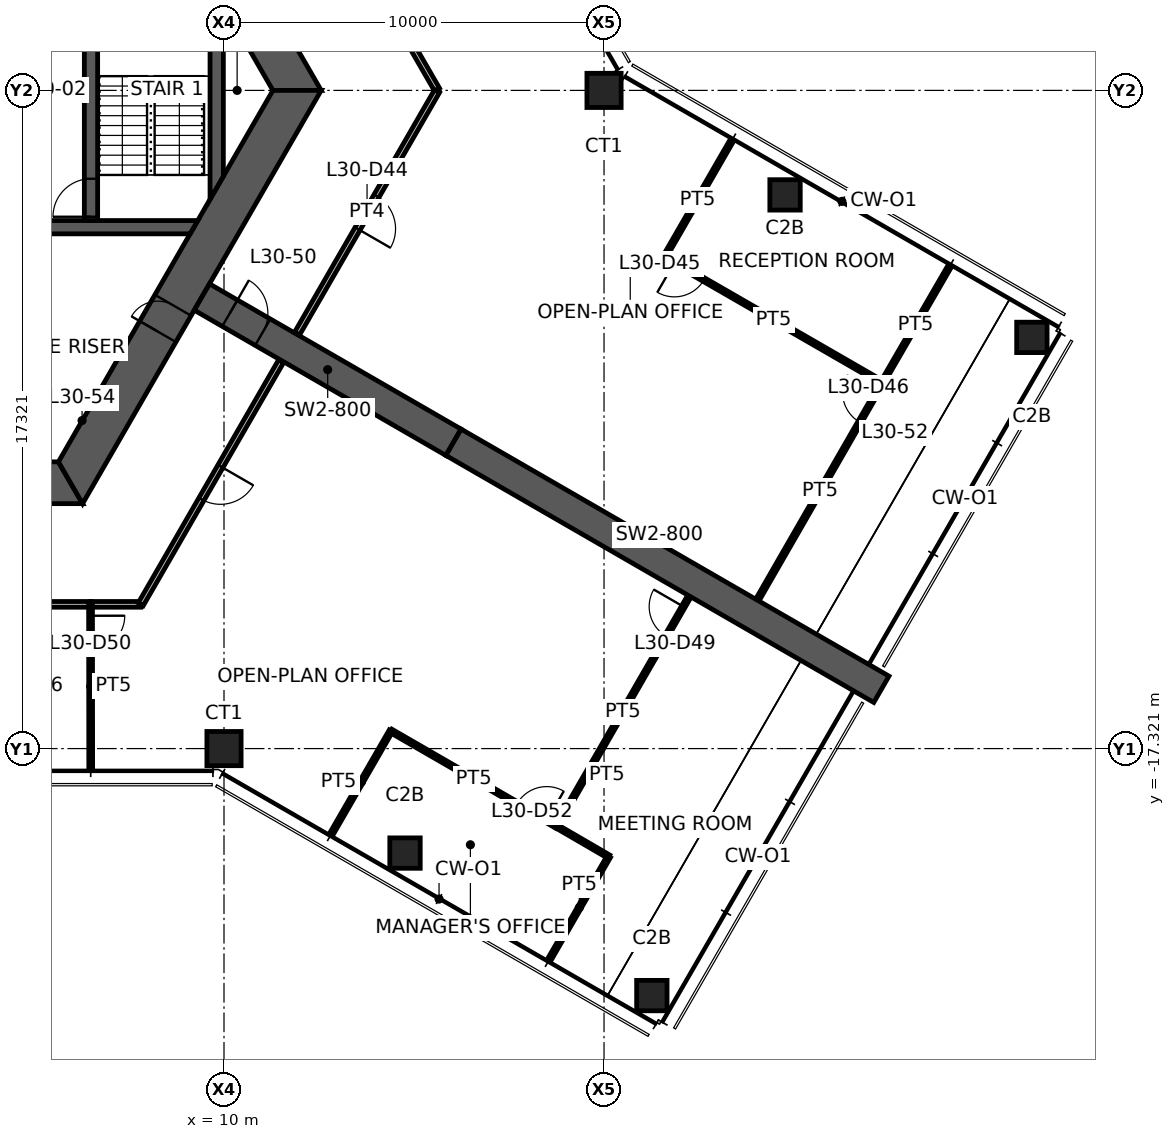
"""IFC4 building model, lengths in metres.
Left out: names, types, materials, properties, quantities, classifications, styles, units other than length and angle.
Written with IfcOpenShell. Run it as: python <this file> out.ifc"""

import sys

from ifc_helpers import new_model, si_unit, direction, frame, frame_2d, origin, origin_2d, place, context, subcontext, project, spatial, polyline, rectangle, hollow_rectangle, outline, extrude, element, fill, save


model = new_model("IFC4")
c1 = context("Model", 3, precision=1e-05, world=origin(), true_north=direction((0.0, 1.0)))
c2 = subcontext(c1, "Body", "Model", "MODEL_VIEW")
j1 = project(units=[si_unit("LENGTHUNIT", "METRE"), si_unit("PLANEANGLEUNIT", "RADIAN")], contexts=[c1])
p1 = place(None, origin())
s1 = spatial("IfcSite", under=j1, at=p1, CompositionType="ELEMENT")
p2 = place(p1, origin())
s2 = spatial("IfcBuilding", under=s1, at=p2, CompositionType="ELEMENT")
p3 = place(p2, frame((0.0, 0.0, 119.7)))
s3 = spatial("IfcBuildingStorey", under=s2, at=p3, CompositionType="ELEMENT", Elevation=119.7)
for number, where, z_axis, x_axis in (
    (1, (20.0, 0.0, 0.0), (0.0, 0.0, 1.0), (1.0, 0.0, 0.0)),
    (2, (10.0, -17.321, 0.0), (0.0, 0.0, 1.0), (1.0, 0.0, 0.0)),
):
    element("IfcColumn", number, at=place(p3, frame(where, z_axis=z_axis, x_axis=x_axis)), inside=s3, PredefinedType="COLUMN", context=c2, shape_type="SweptSolid", body=[
        extrude(hollow_rectangle(XDim=0.9, YDim=0.9, WallThickness=0.07, at=origin_2d()), origin(), (0.0, 0.0, 1.0), 3.9),
    ])
for number, where, z_axis, x_axis in (
    (3, (14.763, -20.071, 0.0), (0.0, 0.0, 1.0), (1.0, 0.0, 0.0)),
    (4, (21.258, -23.821, 0.0), (0.0, 0.0, 1.0), (1.0, 0.0, 0.0)),
    (5, (24.763, -2.75, 0.0), (0.0, 0.0, 1.0), (1.0, 0.0, 0.0)),
    (6, (31.258, -6.5, 0.0), (0.0, 0.0, 1.0), (1.0, 0.0, 0.0)),
):
    element("IfcColumn", number, at=place(p3, frame(where, z_axis=z_axis, x_axis=x_axis)), inside=s3, PredefinedType="COLUMN", context=c2, shape_type="SweptSolid", body=[
        extrude(hollow_rectangle(XDim=0.8, YDim=0.8, WallThickness=0.045, at=origin_2d()), origin(), (0.0, 0.0, 1.0), 3.9),
    ])
p4 = place(p3, frame((11.922, 0.0, 0.0), z_axis=(0.0, 0.0, 1.0), x_axis=(-0.500004296715, 0.866022923061, 0.0)))
e7 = element("IfcWall", 7, at=p4, inside=s3, PredefinedType="SHEAR", context=c2, shape_type="SweptSolid", body=[
    extrude(outline(polyline([(-0.318, -0.55), (5.835, -0.55), (6.635, -0.55), (12.24, -0.55), (11.605, 0.55), (6.635, 0.55), (5.835, 0.55), (0.318, 0.55), (-0.318, -0.55)])), origin(), (0.0, 0.0, 1.0), 3.9),
])
p5 = place(p4, frame((5.835, 0.0, 0.0)))
e8 = element("IfcOpeningElement", 8, at=p5, cuts=e7, PredefinedType="OPENING", context=c2, shape_type="SweptSolid", body=[
    extrude(rectangle(XDim=0.8, YDim=2.1, at=frame_2d((0.4, 1.05))), frame((0.0, 0.56, 0.0), z_axis=(0.0, -1.0, 0.0), x_axis=(1.0, 0.0, 0.0)), (0.0, 0.0, 1.0), 1.12),
])
p6 = place(p3, frame((-5.961, -10.325, 0.0), z_axis=(0.0, 0.0, 1.0), x_axis=(1.0, 0.0, 0.0)))
e9 = element("IfcWall", 9, at=p6, inside=s3, PredefinedType="SHEAR", context=c2, shape_type="SweptSolid", body=[
    extrude(outline(polyline([(-0.318, -0.55), (5.461, -0.55), (6.461, -0.55), (12.24, -0.55), (11.605, 0.55), (6.461, 0.55), (5.461, 0.55), (0.318, 0.55), (-0.318, -0.55)])), origin(), (0.0, 0.0, 1.0), 3.9),
])
p7 = place(p6, frame((5.461, 0.0, 0.0)))
e10 = element("IfcOpeningElement", 10, at=p7, cuts=e9, PredefinedType="OPENING", context=c2, shape_type="SweptSolid", body=[
    extrude(rectangle(XDim=1.0, YDim=2.1, at=frame_2d((0.5, 1.05))), frame((0.0, 0.56, 0.0), z_axis=(0.0, -1.0, 0.0), x_axis=(1.0, 0.0, 0.0)), (0.0, 0.0, 1.0), 1.12),
])
p8 = place(p3, frame((5.961, -10.325, 0.0), z_axis=(0.0, 0.0, 1.0), x_axis=(0.500004296715, 0.866022923061, 0.0)))
e11 = element("IfcWall", 11, at=p8, inside=s3, PredefinedType="SHEAR", context=c2, shape_type="SweptSolid", body=[
    extrude(outline(polyline([(-0.318, -0.55), (4.594, -0.55), (5.394, -0.55), (12.24, -0.55), (11.605, 0.55), (5.394, 0.55), (4.594, 0.55), (0.318, 0.55), (-0.318, -0.55)])), origin(), (0.0, 0.0, 1.0), 3.9),
])
p9 = place(p8, frame((4.594, 0.0, 0.0)))
e12 = element("IfcOpeningElement", 12, at=p9, cuts=e11, PredefinedType="OPENING", context=c2, shape_type="SweptSolid", body=[
    extrude(rectangle(XDim=0.8, YDim=2.1, at=frame_2d((0.4, 1.05))), frame((0.0, 0.56, 0.0), z_axis=(0.0, -1.0, 0.0), x_axis=(1.0, 0.0, 0.0)), (0.0, 0.0, 1.0), 1.12),
])
p10 = place(p3, frame((9.418, -5.438, 0.0), z_axis=(0.0, 0.0, 1.0), x_axis=(0.866029782078, -0.499992416496, 0.0)))
e13 = element("IfcWall", 13, at=p10, inside=s3, PredefinedType="SHEAR", context=c2, shape_type="SweptSolid", body=[
    extrude(rectangle(XDim=7.646, YDim=0.8, at=frame_2d((3.823, 0.0))), origin(), (0.0, 0.0, 1.0), 3.9),
])
p11 = place(p10, frame((0.85, 0.0, 0.0)))
e14 = element("IfcOpeningElement", 14, at=p11, cuts=e13, PredefinedType="OPENING", context=c2, shape_type="SweptSolid", body=[
    extrude(rectangle(XDim=1.0, YDim=2.1, at=frame_2d((0.5, 1.05))), frame((0.0, 0.41, 0.0), z_axis=(0.0, -1.0, 0.0), x_axis=(1.0, 0.0, 0.0)), (0.0, 0.0, 1.0), 0.82),
])
p12 = place(p3, frame((16.039, -9.26, 0.0), z_axis=(0.0, 0.0, 1.0), x_axis=(0.866024837091, -0.50000098154, 0.0)))
e15 = element("IfcWall", 15, at=p12, inside=s3, PredefinedType="SHEAR", context=c2, shape_type="SweptSolid", body=[
    extrude(rectangle(XDim=13.0, YDim=0.8, at=frame_2d((6.5, 0.0))), origin(), (0.0, 0.0, 1.0), 3.9),
])
p13 = place(p3, frame((1.425, -3.6, 0.0), z_axis=(0.0, 0.0, 1.0), x_axis=(1.0, 0.0, 0.0)))
e16 = element("IfcWall", 16, at=p13, inside=s3, PredefinedType="SHEAR", context=c2, shape_type="SweptSolid", body=[
    extrude(outline(polyline([(0.0, -0.175), (1.075, -0.175), (2.175, -0.175), (7.683, -0.175), (7.885, 0.175), (2.175, 0.175), (1.075, 0.175), (0.0, 0.175), (0.0, -0.175)])), origin(), (0.0, 0.0, 1.0), 3.9),
])
p14 = place(p13, frame((1.075, 0.0, 0.0)))
e17 = element("IfcOpeningElement", 17, at=p14, cuts=e16, PredefinedType="OPENING", context=c2, shape_type="SweptSolid", body=[
    extrude(rectangle(XDim=1.1, YDim=2.1, at=frame_2d((0.55, 1.05))), frame((0.0, 0.185, 0.0), z_axis=(0.0, -1.0, 0.0), x_axis=(1.0, 0.0, 0.0)), (0.0, 0.0, 1.0), 0.37),
])
p15 = place(p3, frame((6.5, -3.425, 0.0), z_axis=(0.0, 0.0, 1.0), x_axis=(0.0, 1.0, 0.0)))
e18 = element("IfcWall", 18, at=p15, inside=s3, PredefinedType="SHEAR", context=c2, shape_type="SweptSolid", body=[
    extrude(rectangle(XDim=6.85, YDim=0.35, at=frame_2d((3.425, 0.0))), origin(), (0.0, 0.0, 1.0), 3.9),
])
p16 = place(p15, frame((0.1, 0.0, 0.0)))
e19 = element("IfcOpeningElement", 19, at=p16, cuts=e18, PredefinedType="OPENING", context=c2, shape_type="SweptSolid", body=[
    extrude(rectangle(XDim=1.0, YDim=2.1, at=frame_2d((0.5, 1.05))), frame((0.0, 0.185, 0.0), z_axis=(0.0, -1.0, 0.0), x_axis=(1.0, 0.0, 0.0)), (0.0, 0.0, 1.0), 0.37),
])
p17 = place(p3, frame((9.808, -2.562, 0.0), z_axis=(0.0, 0.0, 1.0), x_axis=(0.0, 1.0, 0.0)))
e20 = element("IfcWall", 20, at=p17, inside=s3, PredefinedType="SHEAR", context=c2, shape_type="SweptSolid", body=[
    extrude(outline(polyline([(0.303, -0.175), (4.821, -0.175), (5.428, 0.175), (-0.303, 0.175), (0.303, -0.175)])), origin(), (0.0, 0.0, 1.0), 3.9),
])
p18 = place(p3, frame((13.334, 3.955, 0.0), z_axis=(0.0, 0.0, 1.0), x_axis=(0.499987549055, -0.866032592222, 0.0)))
e21 = element("IfcWall", 21, at=p18, inside=s3, PredefinedType="PARTITIONING", context=c2, shape_type="SweptSolid", body=[
    extrude(rectangle(XDim=4.544, YDim=0.15, at=frame_2d((2.272, 0.0))), origin(), (0.0, 0.0, 1.0), 2.35),
])
p19 = place(p3, frame((15.606, -0.02, 0.0), z_axis=(0.0, 0.0, 1.0), x_axis=(-0.499989298045, -0.866031582473, 0.0)))
e22 = element("IfcWall", 22, at=p19, inside=s3, PredefinedType="PARTITIONING", context=c2, shape_type="SweptSolid", body=[
    extrude(rectangle(XDim=7.365, YDim=0.15, at=frame_2d((3.683, 0.0))), origin(), (0.0, 0.0, 1.0), 2.35),
])
p20 = place(p19, frame((3.183, 0.0, 0.0)))
e23 = element("IfcOpeningElement", 23, at=p20, cuts=e22, PredefinedType="OPENING", context=c2, shape_type="SweptSolid", body=[
    extrude(rectangle(XDim=1.0, YDim=2.1, at=frame_2d((0.5, 1.05))), frame((0.0, 0.085, 0.0), z_axis=(0.0, -1.0, 0.0), x_axis=(1.0, 0.0, 0.0)), (0.0, 0.0, 1.0), 0.17),
])
p21 = place(p3, frame((29.075, -4.662, 0.0), z_axis=(0.0, 0.0, 1.0), x_axis=(-0.501335959492, -0.865252712056, 0.0)))
e24 = element("IfcWall", 24, at=p21, inside=s3, PredefinedType="PARTITIONING", context=c2, shape_type="SweptSolid", body=[
    extrude(rectangle(XDim=3.5, YDim=0.1, at=frame_2d((1.75, 0.0))), origin(), (0.0, 0.0, 1.0), 2.35),
])
p22 = place(p3, frame((21.592, -4.383, 0.0), z_axis=(0.0, 0.0, 1.0), x_axis=(0.500009906705, 0.86601968407, 0.0)))
e25 = element("IfcWall", 25, at=p22, inside=s3, PredefinedType="PARTITIONING", context=c2, shape_type="SweptSolid", body=[
    extrude(rectangle(XDim=3.48, YDim=0.1, at=frame_2d((1.74, 0.0))), origin(), (0.0, 0.0, 1.0), 2.35),
])
p23 = place(p3, frame((27.327, -7.69, 0.0), z_axis=(0.0, 0.0, 1.0), x_axis=(-0.866318796728, 0.499491483847, 0.0)))
e26 = element("IfcWall", 26, at=p23, inside=s3, PredefinedType="PARTITIONING", context=c2, shape_type="SweptSolid", body=[
    extrude(rectangle(XDim=6.62, YDim=0.1, at=frame_2d((3.31, 0.0))), origin(), (0.0, 0.0, 1.0), 2.35),
])
p24 = place(p23, frame((5.42, 0.0, 0.0)))
e27 = element("IfcOpeningElement", 27, at=p24, cuts=e26, PredefinedType="OPENING", context=c2, shape_type="SweptSolid", body=[
    extrude(rectangle(XDim=0.9, YDim=2.1, at=frame_2d((0.45, 1.05))), frame((0.0, 0.06, 0.0), z_axis=(0.0, -1.0, 0.0), x_axis=(1.0, 0.0, 0.0)), (0.0, 0.0, 1.0), 0.12),
])
p25 = place(p3, frame((24.043, -13.396, 0.0), z_axis=(0.0, 0.0, 1.0), x_axis=(0.498632747728, 0.866813349512, 0.0)))
e28 = element("IfcWall", 28, at=p25, inside=s3, PredefinedType="PARTITIONING", context=c2, shape_type="SweptSolid", body=[
    extrude(rectangle(XDim=6.584, YDim=0.1, at=frame_2d((3.292, 0.0))), origin(), (0.0, 0.0, 1.0), 2.35),
])
p26 = place(p25, frame((5.384, 0.0, 0.0)))
e29 = element("IfcOpeningElement", 29, at=p26, cuts=e28, PredefinedType="OPENING", context=c2, shape_type="SweptSolid", body=[
    extrude(rectangle(XDim=0.9, YDim=2.1, at=frame_2d((0.45, 1.05))), frame((0.0, 0.06, 0.0), z_axis=(0.0, -1.0, 0.0), x_axis=(1.0, 0.0, 0.0)), (0.0, 0.0, 1.0), 0.12),
])
p27 = place(p3, frame((6.498, -13.525, 0.0), z_axis=(0.0, 0.0, 1.0), x_axis=(-1.0, 0.0, 0.0)))
e30 = element("IfcWall", 30, at=p27, inside=s3, PredefinedType="PARTITIONING", context=c2, shape_type="SweptSolid", body=[
    extrude(rectangle(XDim=3.256, YDim=0.15, at=frame_2d((1.628, 0.0))), origin(), (0.0, 0.0, 1.0), 2.35),
])
p28 = place(p3, frame((7.809, -13.525, 0.0), z_axis=(0.0, 0.0, 1.0), x_axis=(-1.0, 0.0, 0.0)))
e31 = element("IfcWall", 31, at=p28, inside=s3, PredefinedType="PARTITIONING", context=c2, shape_type="SweptSolid", body=[
    extrude(rectangle(XDim=1.32, YDim=0.15, at=frame_2d((0.66, 0.0))), origin(), (0.0, 0.0, 1.0), 2.35),
])
p29 = place(p3, frame((11.503, -7.126, 0.0), z_axis=(0.0, 0.0, 1.0), x_axis=(-0.500005620463, -0.866022158784, 0.0)))
e32 = element("IfcWall", 32, at=p29, inside=s3, PredefinedType="PARTITIONING", context=c2, shape_type="SweptSolid", body=[
    extrude(rectangle(XDim=7.389, YDim=0.15, at=frame_2d((3.694, 0.0))), origin(), (0.0, 0.0, 1.0), 2.35),
])
p30 = place(p29, frame((3.194, 0.0, 0.0)))
e33 = element("IfcOpeningElement", 33, at=p30, cuts=e32, PredefinedType="OPENING", context=c2, shape_type="SweptSolid", body=[
    extrude(rectangle(XDim=1.0, YDim=2.1, at=frame_2d((0.5, 1.05))), frame((0.0, 0.085, 0.0), z_axis=(0.0, -1.0, 0.0), x_axis=(1.0, 0.0, 0.0)), (0.0, 0.0, 1.0), 0.17),
])
p31 = place(p3, frame((18.575, -22.849, 0.0), z_axis=(0.0, 0.0, 1.0), x_axis=(0.499899694197, 0.866083307622, 0.0)))
e34 = element("IfcWall", 34, at=p31, inside=s3, PredefinedType="PARTITIONING", context=c2, shape_type="SweptSolid", body=[
    extrude(rectangle(XDim=3.1, YDim=0.1, at=frame_2d((1.55, 0.0))), origin(), (0.0, 0.0, 1.0), 2.35),
])
p32 = place(p3, frame((20.125, -20.164, 0.0), z_axis=(0.0, 0.0, 1.0), x_axis=(-0.864479275947, 0.502668460775, 0.0)))
e35 = element("IfcWall", 35, at=p32, inside=s3, PredefinedType="PARTITIONING", context=c2, shape_type="SweptSolid", body=[
    extrude(rectangle(XDim=1.591, YDim=0.1, at=frame_2d((0.795, 0.0))), origin(), (0.0, 0.0, 1.0), 2.35),
])
p33 = place(p3, frame((18.751, -19.371, 0.0), z_axis=(0.0, 0.0, 1.0), x_axis=(0.499495327337, 0.866316580684, 0.0)))
e36 = element("IfcWall", 36, at=p33, inside=s3, PredefinedType="PARTITIONING", context=c2, shape_type="SweptSolid", body=[
    extrude(rectangle(XDim=6.98, YDim=0.1, at=frame_2d((3.49, 0.0))), origin(), (0.0, 0.0, 1.0), 2.35),
])
p34 = place(p33, frame((5.78, 0.0, 0.0)))
e37 = element("IfcOpeningElement", 37, at=p34, cuts=e36, PredefinedType="OPENING", context=c2, shape_type="SweptSolid", body=[
    extrude(rectangle(XDim=0.9, YDim=2.1, at=frame_2d((0.45, 1.05))), frame((0.0, 0.06, 0.0), z_axis=(0.0, -1.0, 0.0), x_axis=(1.0, 0.0, 0.0)), (0.0, 0.0, 1.0), 0.12),
])
p35 = place(p3, frame((6.488, -13.525, 0.0), z_axis=(0.0, 0.0, 1.0), x_axis=(0.00107362768, -0.999999423662, 0.0)))
e38 = element("IfcWall", 38, at=p35, inside=s3, PredefinedType="PARTITIONING", context=c2, shape_type="SweptSolid", body=[
    extrude(rectangle(XDim=4.321, YDim=0.1, at=frame_2d((2.16, 0.0))), origin(), (0.0, 0.0, 1.0), 2.35),
])
p36 = place(p35, frame((0.3, 0.0, 0.0)))
e39 = element("IfcOpeningElement", 39, at=p36, cuts=e38, PredefinedType="OPENING", context=c2, shape_type="SweptSolid", body=[
    extrude(rectangle(XDim=0.9, YDim=2.1, at=frame_2d((0.45, 1.05))), frame((0.0, 0.06, 0.0), z_axis=(0.0, -1.0, 0.0), x_axis=(1.0, 0.0, 0.0)), (0.0, 0.0, 1.0), 0.12),
])
p37 = place(p3, frame((12.842, -19.539, 0.0), z_axis=(0.0, 0.0, 1.0), x_axis=(0.499933790963, 0.866063626216, 0.0)))
e40 = element("IfcWall", 40, at=p37, inside=s3, PredefinedType="PARTITIONING", context=c2, shape_type="SweptSolid", body=[
    extrude(rectangle(XDim=3.1, YDim=0.1, at=frame_2d((1.55, 0.0))), origin(), (0.0, 0.0, 1.0), 2.35),
])
p38 = place(p3, frame((14.392, -16.854, 0.0), z_axis=(0.0, 0.0, 1.0), x_axis=(0.86601677289, -0.50001494885, 0.0)))
e41 = element("IfcWall", 41, at=p38, inside=s3, PredefinedType="PARTITIONING", context=c2, shape_type="SweptSolid", body=[
    extrude(rectangle(XDim=5.033, YDim=0.1, at=frame_2d((2.517, 0.0))), origin(), (0.0, 0.0, 1.0), 2.35),
])
p39 = place(p38, frame((3.833, 0.0, 0.0)))
e42 = element("IfcOpeningElement", 42, at=p39, cuts=e41, PredefinedType="OPENING", context=c2, shape_type="SweptSolid", body=[
    extrude(rectangle(XDim=0.9, YDim=2.1, at=frame_2d((0.45, 1.05))), frame((0.0, 0.06, 0.0), z_axis=(0.0, -1.0, 0.0), x_axis=(1.0, 0.0, 0.0)), (0.0, 0.0, 1.0), 0.12),
])
p40 = place(p9, origin())
e43 = element("IfcDoor", 43, at=p40, inside=s3, OperationType="SINGLE_SWING_LEFT", PredefinedType="DOOR", context=c2, shape_type="SweptSolid", body=[
    extrude(rectangle(XDim=0.8, YDim=2.1, at=frame_2d((0.4, 1.05))), frame((0.0, 0.025, 0.0), z_axis=(0.0, -1.0, 0.0), x_axis=(1.0, 0.0, 0.0)), (0.0, 0.0, 1.0), 0.05),
])
fill(e12, e43)
p41 = place(p16, origin())
e44 = element("IfcDoor", 44, at=p41, inside=s3, OperationType="SINGLE_SWING_LEFT", PredefinedType="DOOR", context=c2, shape_type="SweptSolid", body=[
    extrude(rectangle(XDim=1.0, YDim=2.1, at=frame_2d((0.5, 1.05))), frame((0.0, 0.025, 0.0), z_axis=(0.0, -1.0, 0.0), x_axis=(1.0, 0.0, 0.0)), (0.0, 0.0, 1.0), 0.05),
])
fill(e19, e44)
p42 = place(p11, origin())
e45 = element("IfcDoor", 45, at=p42, inside=s3, OperationType="SINGLE_SWING_LEFT", PredefinedType="DOOR", context=c2, shape_type="SweptSolid", body=[
    extrude(rectangle(XDim=1.0, YDim=2.1, at=frame_2d((0.5, 1.05))), frame((0.0, 0.025, 0.0), z_axis=(0.0, -1.0, 0.0), x_axis=(1.0, 0.0, 0.0)), (0.0, 0.0, 1.0), 0.05),
])
fill(e14, e45)
p43 = place(p20, origin())
e46 = element("IfcDoor", 46, at=p43, inside=s3, OperationType="SINGLE_SWING_RIGHT", PredefinedType="DOOR", context=c2, shape_type="SweptSolid", body=[
    extrude(rectangle(XDim=1.0, YDim=2.1, at=frame_2d((0.5, 1.05))), frame((0.0, 0.025, 0.0), z_axis=(0.0, -1.0, 0.0), x_axis=(1.0, 0.0, 0.0)), (0.0, 0.0, 1.0), 0.05),
])
fill(e23, e46)
p44 = place(p24, origin())
e47 = element("IfcDoor", 47, at=p44, inside=s3, OperationType="SINGLE_SWING_RIGHT", PredefinedType="DOOR", context=c2, shape_type="SweptSolid", body=[
    extrude(rectangle(XDim=0.9, YDim=2.1, at=frame_2d((0.45, 1.05))), frame((0.0, 0.025, 0.0), z_axis=(0.0, -1.0, 0.0), x_axis=(1.0, 0.0, 0.0)), (0.0, 0.0, 1.0), 0.05),
])
fill(e27, e47)
p45 = place(p26, origin())
e48 = element("IfcDoor", 48, at=p45, inside=s3, OperationType="SINGLE_SWING_RIGHT", PredefinedType="DOOR", context=c2, shape_type="SweptSolid", body=[
    extrude(rectangle(XDim=0.9, YDim=2.1, at=frame_2d((0.45, 1.05))), frame((0.0, 0.025, 0.0), z_axis=(0.0, -1.0, 0.0), x_axis=(1.0, 0.0, 0.0)), (0.0, 0.0, 1.0), 0.05),
])
fill(e29, e48)
p46 = place(p30, origin())
e49 = element("IfcDoor", 49, at=p46, inside=s3, OperationType="SINGLE_SWING_LEFT", PredefinedType="DOOR", context=c2, shape_type="SweptSolid", body=[
    extrude(rectangle(XDim=1.0, YDim=2.1, at=frame_2d((0.5, 1.05))), frame((0.0, 0.025, 0.0), z_axis=(0.0, -1.0, 0.0), x_axis=(1.0, 0.0, 0.0)), (0.0, 0.0, 1.0), 0.05),
])
fill(e33, e49)
p47 = place(p34, origin())
e50 = element("IfcDoor", 50, at=p47, inside=s3, OperationType="SINGLE_SWING_RIGHT", PredefinedType="DOOR", context=c2, shape_type="SweptSolid", body=[
    extrude(rectangle(XDim=0.9, YDim=2.1, at=frame_2d((0.45, 1.05))), frame((0.0, 0.025, 0.0), z_axis=(0.0, -1.0, 0.0), x_axis=(1.0, 0.0, 0.0)), (0.0, 0.0, 1.0), 0.05),
])
fill(e37, e50)
p48 = place(p36, origin())
e51 = element("IfcDoor", 51, at=p48, inside=s3, OperationType="SINGLE_SWING_LEFT", PredefinedType="DOOR", context=c2, shape_type="SweptSolid", body=[
    extrude(rectangle(XDim=0.9, YDim=2.1, at=frame_2d((0.45, 1.05))), frame((0.0, 0.025, 0.0), z_axis=(0.0, -1.0, 0.0), x_axis=(1.0, 0.0, 0.0)), (0.0, 0.0, 1.0), 0.05),
])
fill(e39, e51)
p49 = place(p39, origin())
e52 = element("IfcDoor", 52, at=p49, inside=s3, OperationType="SINGLE_SWING_RIGHT", PredefinedType="DOOR", context=c2, shape_type="SweptSolid", body=[
    extrude(rectangle(XDim=0.9, YDim=2.1, at=frame_2d((0.45, 1.05))), frame((0.0, 0.025, 0.0), z_axis=(0.0, -1.0, 0.0), x_axis=(1.0, 0.0, 0.0)), (0.0, 0.0, 1.0), 0.05),
])
fill(e42, e52)
save(model, sys.argv[1])
